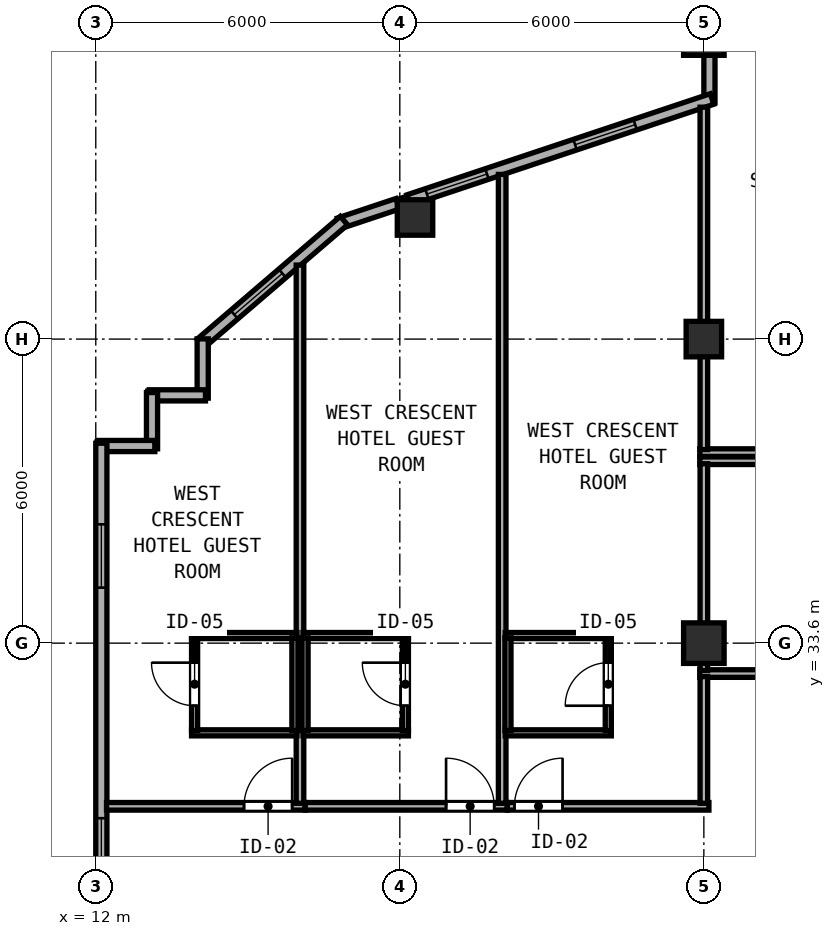
"""IFC4 building model, lengths in metres.
Left out: names, types, materials, properties, quantities, classifications, styles, units other than length and angle.
Written with IfcOpenShell. Run it as: python <this file> out.ifc"""

import sys

from ifc_helpers import new_model, si_unit, direction, frame, frame_2d, origin, origin_2d, place, context, subcontext, project, spatial, rectangle, hollow_rectangle, extrude, element, fill, save


model = new_model("IFC4")
c1 = context("Model", 3, precision=1e-05, world=origin(), true_north=direction((0.0, 1.0)))
c2 = subcontext(c1, "Body", "Model", "MODEL_VIEW")
j1 = project(units=[si_unit("LENGTHUNIT", "METRE"), si_unit("PLANEANGLEUNIT", "RADIAN")], contexts=[c1])
p1 = place(None, origin())
s1 = spatial("IfcSite", under=j1, at=p1, CompositionType="ELEMENT")
p2 = place(p1, origin())
s2 = spatial("IfcBuilding", under=s1, at=p2, CompositionType="ELEMENT")
p3 = place(p2, frame((0.0, 0.0, 258.3)))
s3 = spatial("IfcBuildingStorey", under=s2, at=p3, CompositionType="ELEMENT", Elevation=258.3)
for number, where, z_axis, x_axis in (
    (1, (24.0, 33.6, 0.0), (0.0, 0.0, 1.0), (1.0, 0.0, 0.0)),
    (2, (24.0, 45.6, 0.0), (0.0, 0.0, 1.0), (1.0, 0.0, 0.0)),
):
    element("IfcColumn", number, at=place(p3, frame(where, z_axis=z_axis, x_axis=x_axis)), inside=s3, PredefinedType="COLUMN", context=c2, shape_type="SweptSolid", body=[
        extrude(hollow_rectangle(XDim=0.8, YDim=0.8, WallThickness=0.03, at=origin_2d()), origin(), (0.0, 0.0, 1.0), 3.85),
    ])
for number, where, z_axis, x_axis in (
    (3, (24.0, 39.6, 0.0), (0.0, 0.0, 1.0), (1.0, 0.0, 0.0)),
    (4, (18.3, 42.0, 0.0), (0.0, 0.0, 1.0), (1.0, 0.0, 0.0)),
):
    element("IfcColumn", number, at=place(p3, frame(where, z_axis=z_axis, x_axis=x_axis)), inside=s3, PredefinedType="COLUMN", context=c2, shape_type="SweptSolid", body=[
        extrude(hollow_rectangle(XDim=0.7, YDim=0.7, WallThickness=0.026, at=origin_2d()), origin(), (0.0, 0.0, 1.0), 3.85),
    ])
p4 = place(p3, frame((24.11, 45.208, 0.0), z_axis=(0.0, 0.0, 1.0), x_axis=(0.0, -1.0, 0.0)))
e5 = element("IfcWall", 5, at=p4, inside=s3, PredefinedType="SOLIDWALL", context=c2, shape_type="SweptSolid", body=[
    extrude(rectangle(XDim=0.942, YDim=0.22, at=frame_2d((0.471, 0.0))), origin(), (0.0, 0.0, 1.0), 3.315),
])
p5 = place(p3, frame((24.162, 44.338, 0.0), z_axis=(0.0, 0.0, 1.0), x_axis=(-0.948687165594, -0.31621616315, 0.0)))
e6 = element("IfcWall", 6, at=p5, inside=s3, PredefinedType="SOLIDWALL", context=c2, shape_type="SweptSolid", body=[
    extrude(rectangle(XDim=6.312, YDim=0.22, at=frame_2d((3.156, 0.0))), origin(), (0.0, 0.0, 1.0), 3.315),
])
p6 = place(p5, frame((1.6, 0.0, 0.85)))
e7 = element("IfcOpeningElement", 7, at=p6, cuts=e6, PredefinedType="OPENING", context=c2, shape_type="SweptSolid", body=[
    extrude(rectangle(XDim=1.25, YDim=1.95, at=frame_2d((0.625, 0.975))), frame((0.0, 0.12, 0.0), z_axis=(0.0, -1.0, 0.0), x_axis=(1.0, 0.0, 0.0)), (0.0, 0.0, 1.0), 0.24),
])
p7 = place(p5, frame((4.682, 0.0, 0.85)))
e8 = element("IfcOpeningElement", 8, at=p7, cuts=e6, PredefinedType="OPENING", context=c2, shape_type="SweptSolid", body=[
    extrude(rectangle(XDim=1.25, YDim=1.95, at=frame_2d((0.625, 0.975))), frame((0.0, 0.12, 0.0), z_axis=(0.0, -1.0, 0.0), x_axis=(1.0, 0.0, 0.0)), (0.0, 0.0, 1.0), 0.24),
])
p8 = place(p3, frame((17.958, 42.27, 0.0), z_axis=(0.0, 0.0, 1.0), x_axis=(-0.948683298051, -0.316227766017, 0.0)))
e9 = element("IfcWall", 9, at=p8, inside=s3, PredefinedType="SOLIDWALL", context=c2, shape_type="SweptSolid", body=[
    extrude(rectangle(XDim=1.218, YDim=0.22, at=frame_2d((0.609, 0.0))), origin(), (0.0, 0.0, 1.0), 3.67),
])
p9 = place(p3, frame((16.897, 41.938, 0.0), z_axis=(0.0, 0.0, 1.0), x_axis=(-0.759279729622, -0.650764390686, 0.0)))
e10 = element("IfcWall", 10, at=p9, inside=s3, PredefinedType="SOLIDWALL", context=c2, shape_type="SweptSolid", body=[
    extrude(rectangle(XDim=3.726, YDim=0.22, at=frame_2d((1.863, 0.0))), origin(), (0.0, 0.0, 1.0), 3.67),
])
p10 = place(p9, frame((1.6, 0.0, 0.85)))
e11 = element("IfcOpeningElement", 11, at=p10, cuts=e10, PredefinedType="OPENING", context=c2, shape_type="SweptSolid", body=[
    extrude(rectangle(XDim=1.25, YDim=1.95, at=frame_2d((0.625, 0.975))), frame((0.0, 0.12, 0.0), z_axis=(0.0, -1.0, 0.0), x_axis=(1.0, 0.0, 0.0)), (0.0, 0.0, 1.0), 0.24),
])
p11 = place(p3, frame((14.11, 39.604, 0.0), z_axis=(0.0, 0.0, 1.0), x_axis=(0.0, -1.0, 0.0)))
e12 = element("IfcWall", 12, at=p11, inside=s3, PredefinedType="SOLIDWALL", context=c2, shape_type="SweptSolid", body=[
    extrude(rectangle(XDim=1.169, YDim=0.22, at=frame_2d((0.585, 0.0))), origin(), (0.0, 0.0, 1.0), 3.67),
])
p12 = place(p3, frame((14.165, 38.49, 0.0), z_axis=(0.0, 0.0, 1.0), x_axis=(-1.0, 0.0, 0.0)))
e13 = element("IfcWall", 13, at=p12, inside=s3, PredefinedType="SOLIDWALL", context=c2, shape_type="SweptSolid", body=[
    extrude(rectangle(XDim=1.11, YDim=0.22, at=frame_2d((0.555, 0.0))), origin(), (0.0, 0.0, 1.0), 3.67),
])
p13 = place(p3, frame((13.11, 38.545, 0.0), z_axis=(0.0, 0.0, 1.0), x_axis=(0.0, -1.0, 0.0)))
e14 = element("IfcWall", 14, at=p13, inside=s3, PredefinedType="SOLIDWALL", context=c2, shape_type="SweptSolid", body=[
    extrude(rectangle(XDim=1.11, YDim=0.22, at=frame_2d((0.555, 0.0))), origin(), (0.0, 0.0, 1.0), 3.67),
])
p14 = place(p3, frame((13.165, 37.49, 0.0), z_axis=(0.0, 0.0, 1.0), x_axis=(-1.0, 0.0, 0.0)))
e15 = element("IfcWall", 15, at=p14, inside=s3, PredefinedType="SOLIDWALL", context=c2, shape_type="SweptSolid", body=[
    extrude(rectangle(XDim=1.11, YDim=0.22, at=frame_2d((0.555, 0.0))), origin(), (0.0, 0.0, 1.0), 3.67),
])
p15 = place(p3, frame((12.11, 37.545, 0.0), z_axis=(0.0, 0.0, 1.0), x_axis=(0.0, -1.0, 0.0)))
e16 = element("IfcWall", 16, at=p15, inside=s3, PredefinedType="SOLIDWALL", context=c2, shape_type="SweptSolid", body=[
    extrude(rectangle(XDim=21.145, YDim=0.22, at=frame_2d((10.573, 0.0))), origin(), (0.0, 0.0, 1.0), 3.67),
])
p16 = place(p15, frame((1.6, 0.0, 0.85)))
e17 = element("IfcOpeningElement", 17, at=p16, cuts=e16, PredefinedType="OPENING", context=c2, shape_type="SweptSolid", body=[
    extrude(rectangle(XDim=1.25, YDim=1.95, at=frame_2d((0.625, 0.975))), frame((0.0, 0.12, 0.0), z_axis=(0.0, -1.0, 0.0), x_axis=(1.0, 0.0, 0.0)), (0.0, 0.0, 1.0), 0.24),
])
p17 = place(p15, frame((7.4, 0.0, 0.85)))
e18 = element("IfcOpeningElement", 18, at=p17, cuts=e16, PredefinedType="OPENING", context=c2, shape_type="SweptSolid", body=[
    extrude(rectangle(XDim=1.25, YDim=1.95, at=frame_2d((0.625, 0.975))), frame((0.0, 0.12, 0.0), z_axis=(0.0, -1.0, 0.0), x_axis=(1.0, 0.0, 0.0)), (0.0, 0.0, 1.0), 0.24),
])
p18 = place(p15, frame((12.4, 0.0, 0.85)))
e19 = element("IfcOpeningElement", 19, at=p18, cuts=e16, PredefinedType="OPENING", context=c2, shape_type="SweptSolid", body=[
    extrude(rectangle(XDim=1.25, YDim=1.95, at=frame_2d((0.625, 0.975))), frame((0.0, 0.12, 0.0), z_axis=(0.0, -1.0, 0.0), x_axis=(1.0, 0.0, 0.0)), (0.0, 0.0, 1.0), 0.24),
])
p19 = place(p15, frame((17.8, 0.0, 0.85)))
e20 = element("IfcOpeningElement", 20, at=p19, cuts=e16, PredefinedType="OPENING", context=c2, shape_type="SweptSolid", body=[
    extrude(rectangle(XDim=1.25, YDim=1.95, at=frame_2d((0.625, 0.975))), frame((0.0, 0.12, 0.0), z_axis=(0.0, -1.0, 0.0), x_axis=(1.0, 0.0, 0.0)), (0.0, 0.0, 1.0), 0.24),
])
for number, where, z_axis, x_axis in (
    (21, (23.92, 37.2, 0.0), (0.0, 0.0, 1.0), (1.0, 0.0, 0.0)),
    (22, (23.92, 33.0, 0.0), (0.0, 0.0, 1.0), (1.0, 0.0, 0.0)),
):
    element("IfcWall", number, at=place(p3, frame(where, z_axis=z_axis, x_axis=x_axis)), inside=s3, PredefinedType="PARTITIONING", context=c2, shape_type="SweptSolid", body=[
        extrude(rectangle(XDim=4.04, YDim=0.15, at=frame_2d((2.02, 0.0))), origin(), (0.0, 0.0, 1.0), 3.67),
    ])
p20 = place(p3, frame((24.0, 33.06, 0.0), z_axis=(0.0, 0.0, 1.0), x_axis=(0.0, 1.0, 0.0)))
e23 = element("IfcWall", 23, at=p20, inside=s3, PredefinedType="PARTITIONING", context=c2, shape_type="SweptSolid", body=[
    extrude(rectangle(XDim=4.08, YDim=0.15, at=frame_2d((2.04, 0.0))), origin(), (0.0, 0.0, 1.0), 3.315),
])
p21 = place(p3, frame((23.92, 37.36, 0.0), z_axis=(0.0, 0.0, 1.0), x_axis=(1.0, 0.0, 0.0)))
e24 = element("IfcWall", 24, at=p21, inside=s3, PredefinedType="PARTITIONING", context=c2, shape_type="SweptSolid", body=[
    extrude(rectangle(XDim=4.04, YDim=0.15, at=frame_2d((2.02, 0.0))), origin(), (0.0, 0.0, 1.0), 3.67),
])
p22 = place(p3, frame((24.0, 37.42, 0.0), z_axis=(0.0, 0.0, 1.0), x_axis=(0.0, 1.0, 0.0)))
e25 = element("IfcWall", 25, at=p22, inside=s3, PredefinedType="PARTITIONING", context=c2, shape_type="SweptSolid", body=[
    extrude(rectangle(XDim=6.757, YDim=0.15, at=frame_2d((3.378, 0.0))), origin(), (0.0, 0.0, 1.0), 3.315),
])
p23 = place(p3, frame((12.212, 30.38, 0.0), z_axis=(0.0, 0.0, 1.0), x_axis=(1.0, 0.0, 0.0)))
e26 = element("IfcWall", 26, at=p23, inside=s3, PredefinedType="PARTITIONING", context=c2, shape_type="SweptSolid", body=[
    extrude(rectangle(XDim=3.918, YDim=0.15, at=frame_2d((1.959, 0.0))), origin(), (0.0, 0.0, 1.0), 3.67),
])
p24 = place(p23, frame((2.713, 0.0, 0.0)))
e27 = element("IfcOpeningElement", 27, at=p24, cuts=e26, PredefinedType="OPENING", context=c2, shape_type="SweptSolid", body=[
    extrude(rectangle(XDim=0.95, YDim=2.15, at=frame_2d((0.475, 1.075))), frame((0.0, 0.085, 0.0), z_axis=(0.0, -1.0, 0.0), x_axis=(1.0, 0.0, 0.0)), (0.0, 0.0, 1.0), 0.17),
])
p25 = place(p3, frame((16.03, 30.44, 0.0), z_axis=(0.0, 0.0, 1.0), x_axis=(0.0, 1.0, 0.0)))
e28 = element("IfcWall", 28, at=p25, inside=s3, PredefinedType="PARTITIONING", context=c2, shape_type="SweptSolid", body=[
    extrude(rectangle(XDim=10.621, YDim=0.15, at=frame_2d((5.311, 0.0))), origin(), (0.0, 0.0, 1.0), 3.67),
])
for number, where, z_axis, x_axis in (
    (29, (13.89, 33.75, 0.0), (0.0, 0.0, 1.0), (1.0, 0.0, 0.0)),
    (30, (13.89, 31.83, 0.0), (0.0, 0.0, 1.0), (1.0, 0.0, 0.0)),
):
    element("IfcWall", number, at=place(p3, frame(where, z_axis=z_axis, x_axis=x_axis)), inside=s3, PredefinedType="PARTITIONING", context=c2, shape_type="SweptSolid", body=[
        extrude(rectangle(XDim=2.08, YDim=0.12, at=frame_2d((1.04, 0.0))), origin(), (0.0, 0.0, 1.0), 3.67),
    ])
p26 = place(p3, frame((13.95, 31.875, 0.0), z_axis=(0.0, 0.0, 1.0), x_axis=(0.0, 1.0, 0.0)))
e31 = element("IfcWall", 31, at=p26, inside=s3, PredefinedType="PARTITIONING", context=c2, shape_type="SweptSolid", body=[
    extrude(rectangle(XDim=1.83, YDim=0.12, at=frame_2d((0.915, 0.0))), origin(), (0.0, 0.0, 1.0), 3.67),
])
p27 = place(p26, frame((1.34, 0.0, 0.0), z_axis=(0.0, 0.0, 1.0), x_axis=(-1.0, 0.0, 0.0)))
e32 = element("IfcOpeningElement", 32, at=p27, cuts=e31, PredefinedType="OPENING", context=c2, shape_type="SweptSolid", body=[
    extrude(rectangle(XDim=0.85, YDim=2.1, at=frame_2d((0.425, 1.05))), frame((0.0, 0.07, 0.0), z_axis=(0.0, -1.0, 0.0), x_axis=(1.0, 0.0, 0.0)), (0.0, 0.0, 1.0), 0.14),
])
p28 = place(p3, frame((15.93, 31.875, 0.0), z_axis=(0.0, 0.0, 1.0), x_axis=(0.0, 1.0, 0.0)))
e33 = element("IfcWall", 33, at=p28, inside=s3, PredefinedType="PARTITIONING", context=c2, shape_type="SweptSolid", body=[
    extrude(rectangle(XDim=1.83, YDim=0.12, at=frame_2d((0.915, 0.0))), origin(), (0.0, 0.0, 1.0), 3.67),
])
p29 = place(p3, frame((16.132, 30.38, 0.0), z_axis=(0.0, 0.0, 1.0), x_axis=(1.0, 0.0, 0.0)))
e34 = element("IfcWall", 34, at=p29, inside=s3, PredefinedType="PARTITIONING", context=c2, shape_type="SweptSolid", body=[
    extrude(rectangle(XDim=3.988, YDim=0.15, at=frame_2d((1.994, 0.0))), origin(), (0.0, 0.0, 1.0), 3.67),
])
p30 = place(p29, frame((2.781, 0.0, 0.0)))
e35 = element("IfcOpeningElement", 35, at=p30, cuts=e34, PredefinedType="OPENING", context=c2, shape_type="SweptSolid", body=[
    extrude(rectangle(XDim=0.95, YDim=2.15, at=frame_2d((0.475, 1.075))), frame((0.0, 0.085, 0.0), z_axis=(0.0, -1.0, 0.0), x_axis=(1.0, 0.0, 0.0)), (0.0, 0.0, 1.0), 0.17),
])
p31 = place(p3, frame((20.02, 30.44, 0.0), z_axis=(0.0, 0.0, 1.0), x_axis=(0.0, 1.0, 0.0)))
e36 = element("IfcWall", 36, at=p31, inside=s3, PredefinedType="PARTITIONING", context=c2, shape_type="SweptSolid", body=[
    extrude(rectangle(XDim=12.41, YDim=0.15, at=frame_2d((6.205, 0.0))), origin(), (0.0, 0.0, 1.0), 3.67),
])
for number, where, z_axis, x_axis in (
    (37, (16.09, 33.75, 0.0), (0.0, 0.0, 1.0), (1.0, 0.0, 0.0)),
    (38, (16.09, 31.83, 0.0), (0.0, 0.0, 1.0), (1.0, 0.0, 0.0)),
):
    element("IfcWall", number, at=place(p3, frame(where, z_axis=z_axis, x_axis=x_axis)), inside=s3, PredefinedType="PARTITIONING", context=c2, shape_type="SweptSolid", body=[
        extrude(rectangle(XDim=2.08, YDim=0.12, at=frame_2d((1.04, 0.0))), origin(), (0.0, 0.0, 1.0), 3.67),
    ])
p32 = place(p3, frame((16.13, 31.875, 0.0), z_axis=(0.0, 0.0, 1.0), x_axis=(0.0, 1.0, 0.0)))
e39 = element("IfcWall", 39, at=p32, inside=s3, PredefinedType="PARTITIONING", context=c2, shape_type="SweptSolid", body=[
    extrude(rectangle(XDim=1.83, YDim=0.12, at=frame_2d((0.915, 0.0))), origin(), (0.0, 0.0, 1.0), 3.67),
])
p33 = place(p3, frame((18.11, 31.875, 0.0), z_axis=(0.0, 0.0, 1.0), x_axis=(0.0, 1.0, 0.0)))
e40 = element("IfcWall", 40, at=p33, inside=s3, PredefinedType="PARTITIONING", context=c2, shape_type="SweptSolid", body=[
    extrude(rectangle(XDim=1.83, YDim=0.12, at=frame_2d((0.915, 0.0))), origin(), (0.0, 0.0, 1.0), 3.67),
])
p34 = place(p33, frame((0.49, 0.0, 0.0)))
e41 = element("IfcOpeningElement", 41, at=p34, cuts=e40, PredefinedType="OPENING", context=c2, shape_type="SweptSolid", body=[
    extrude(rectangle(XDim=0.85, YDim=2.1, at=frame_2d((0.425, 1.05))), frame((0.0, 0.07, 0.0), z_axis=(0.0, -1.0, 0.0), x_axis=(1.0, 0.0, 0.0)), (0.0, 0.0, 1.0), 0.14),
])
p35 = place(p3, frame((20.122, 30.38, 0.0), z_axis=(0.0, 0.0, 1.0), x_axis=(1.0, 0.0, 0.0)))
e42 = element("IfcWall", 42, at=p35, inside=s3, PredefinedType="PARTITIONING", context=c2, shape_type="SweptSolid", body=[
    extrude(rectangle(XDim=3.978, YDim=0.15, at=frame_2d((1.989, 0.0))), origin(), (0.0, 0.0, 1.0), 3.67),
])
p36 = place(p35, frame((0.14, 0.0, 0.0)))
e43 = element("IfcOpeningElement", 43, at=p36, cuts=e42, PredefinedType="OPENING", context=c2, shape_type="SweptSolid", body=[
    extrude(rectangle(XDim=0.95, YDim=2.15, at=frame_2d((0.475, 1.075))), frame((0.0, 0.085, 0.0), z_axis=(0.0, -1.0, 0.0), x_axis=(1.0, 0.0, 0.0)), (0.0, 0.0, 1.0), 0.17),
])
p37 = place(p3, frame((24.0, 30.44, 0.0), z_axis=(0.0, 0.0, 1.0), x_axis=(0.0, 1.0, 0.0)))
e44 = element("IfcWall", 44, at=p37, inside=s3, PredefinedType="PARTITIONING", context=c2, shape_type="SweptSolid", body=[
    extrude(rectangle(XDim=2.5, YDim=0.15, at=frame_2d((1.25, 0.0))), origin(), (0.0, 0.0, 1.0), 3.315),
])
for number, where, z_axis, x_axis in (
    (45, (20.08, 33.75, 0.0), (0.0, 0.0, 1.0), (1.0, 0.0, 0.0)),
    (46, (20.08, 31.83, 0.0), (0.0, 0.0, 1.0), (1.0, 0.0, 0.0)),
):
    element("IfcWall", number, at=place(p3, frame(where, z_axis=z_axis, x_axis=x_axis)), inside=s3, PredefinedType="PARTITIONING", context=c2, shape_type="SweptSolid", body=[
        extrude(rectangle(XDim=2.094, YDim=0.12, at=frame_2d((1.047, 0.0))), origin(), (0.0, 0.0, 1.0), 3.67),
    ])
p38 = place(p3, frame((20.134, 31.875, 0.0), z_axis=(0.0, 0.0, 1.0), x_axis=(0.0, 1.0, 0.0)))
e47 = element("IfcWall", 47, at=p38, inside=s3, PredefinedType="PARTITIONING", context=c2, shape_type="SweptSolid", body=[
    extrude(rectangle(XDim=1.83, YDim=0.12, at=frame_2d((0.915, 0.0))), origin(), (0.0, 0.0, 1.0), 3.67),
])
p39 = place(p3, frame((22.114, 31.875, 0.0), z_axis=(0.0, 0.0, 1.0), x_axis=(0.0, 1.0, 0.0)))
e48 = element("IfcWall", 48, at=p39, inside=s3, PredefinedType="PARTITIONING", context=c2, shape_type="SweptSolid", body=[
    extrude(rectangle(XDim=1.83, YDim=0.12, at=frame_2d((0.915, 0.0))), origin(), (0.0, 0.0, 1.0), 3.67),
])
p40 = place(p39, frame((0.49, 0.0, 0.0)))
e49 = element("IfcOpeningElement", 49, at=p40, cuts=e48, PredefinedType="OPENING", context=c2, shape_type="SweptSolid", body=[
    extrude(rectangle(XDim=0.85, YDim=2.1, at=frame_2d((0.425, 1.05))), frame((0.0, 0.07, 0.0), z_axis=(0.0, -1.0, 0.0), x_axis=(1.0, 0.0, 0.0)), (0.0, 0.0, 1.0), 0.14),
])
p41 = place(p6, origin())
e50 = element("IfcWindow", 50, at=p41, inside=s3, PartitioningType="SINGLE_PANEL", PredefinedType="WINDOW", context=c2, shape_type="SweptSolid", body=[
    extrude(rectangle(XDim=1.25, YDim=1.95, at=frame_2d((0.625, 0.975))), frame((0.0, 0.03, 0.0), z_axis=(0.0, -1.0, 0.0), x_axis=(1.0, 0.0, 0.0)), (0.0, 0.0, 1.0), 0.06),
])
fill(e7, e50)
p42 = place(p10, origin())
e51 = element("IfcWindow", 51, at=p42, inside=s3, PartitioningType="SINGLE_PANEL", PredefinedType="WINDOW", context=c2, shape_type="SweptSolid", body=[
    extrude(rectangle(XDim=1.25, YDim=1.95, at=frame_2d((0.625, 0.975))), frame((0.0, 0.03, 0.0), z_axis=(0.0, -1.0, 0.0), x_axis=(1.0, 0.0, 0.0)), (0.0, 0.0, 1.0), 0.06),
])
fill(e11, e51)
p43 = place(p16, origin())
e52 = element("IfcWindow", 52, at=p43, inside=s3, PartitioningType="SINGLE_PANEL", PredefinedType="WINDOW", context=c2, shape_type="SweptSolid", body=[
    extrude(rectangle(XDim=1.25, YDim=1.95, at=frame_2d((0.625, 0.975))), frame((0.0, 0.03, 0.0), z_axis=(0.0, -1.0, 0.0), x_axis=(1.0, 0.0, 0.0)), (0.0, 0.0, 1.0), 0.06),
])
fill(e17, e52)
p44 = place(p17, origin())
e53 = element("IfcWindow", 53, at=p44, inside=s3, PartitioningType="SINGLE_PANEL", PredefinedType="WINDOW", context=c2, shape_type="SweptSolid", body=[
    extrude(rectangle(XDim=1.25, YDim=1.95, at=frame_2d((0.625, 0.975))), frame((0.0, 0.03, 0.0), z_axis=(0.0, -1.0, 0.0), x_axis=(1.0, 0.0, 0.0)), (0.0, 0.0, 1.0), 0.06),
])
fill(e18, e53)
p45 = place(p24, origin())
e54 = element("IfcDoor", 54, at=p45, inside=s3, OperationType="SINGLE_SWING_RIGHT", PredefinedType="DOOR", context=c2, shape_type="SweptSolid", body=[
    extrude(rectangle(XDim=0.95, YDim=2.15, at=frame_2d((0.475, 1.075))), frame((0.0, 0.025, 0.0), z_axis=(0.0, -1.0, 0.0), x_axis=(1.0, 0.0, 0.0)), (0.0, 0.0, 1.0), 0.05),
])
fill(e27, e54)
p46 = place(p27, origin())
e55 = element("IfcDoor", 55, at=p46, inside=s3, OperationType="SINGLE_SWING_LEFT", PredefinedType="DOOR", context=c2, shape_type="SweptSolid", body=[
    extrude(rectangle(XDim=0.85, YDim=2.1, at=frame_2d((0.425, 1.05))), frame((0.0, 0.025, 0.0), z_axis=(0.0, -1.0, 0.0), x_axis=(1.0, 0.0, 0.0)), (0.0, 0.0, 1.0), 0.05),
])
fill(e32, e55)
p47 = place(p30, origin())
e56 = element("IfcDoor", 56, at=p47, inside=s3, OperationType="SINGLE_SWING_LEFT", PredefinedType="DOOR", context=c2, shape_type="SweptSolid", body=[
    extrude(rectangle(XDim=0.95, YDim=2.15, at=frame_2d((0.475, 1.075))), frame((0.0, 0.025, 0.0), z_axis=(0.0, -1.0, 0.0), x_axis=(1.0, 0.0, 0.0)), (0.0, 0.0, 1.0), 0.05),
])
fill(e35, e56)
p48 = place(p34, origin())
e57 = element("IfcDoor", 57, at=p48, inside=s3, OperationType="SINGLE_SWING_RIGHT", PredefinedType="DOOR", context=c2, shape_type="SweptSolid", body=[
    extrude(rectangle(XDim=0.85, YDim=2.1, at=frame_2d((0.425, 1.05))), frame((0.0, 0.025, 0.0), z_axis=(0.0, -1.0, 0.0), x_axis=(1.0, 0.0, 0.0)), (0.0, 0.0, 1.0), 0.05),
])
fill(e41, e57)
p49 = place(p36, origin())
e58 = element("IfcDoor", 58, at=p49, inside=s3, OperationType="SINGLE_SWING_RIGHT", PredefinedType="DOOR", context=c2, shape_type="SweptSolid", body=[
    extrude(rectangle(XDim=0.95, YDim=2.15, at=frame_2d((0.475, 1.075))), frame((0.0, 0.025, 0.0), z_axis=(0.0, -1.0, 0.0), x_axis=(1.0, 0.0, 0.0)), (0.0, 0.0, 1.0), 0.05),
])
fill(e43, e58)
p50 = place(p40, origin())
e59 = element("IfcDoor", 59, at=p50, inside=s3, OperationType="SINGLE_SWING_LEFT", PredefinedType="DOOR", context=c2, shape_type="SweptSolid", body=[
    extrude(rectangle(XDim=0.85, YDim=2.1, at=frame_2d((0.425, 1.05))), frame((0.0, 0.025, 0.0), z_axis=(0.0, -1.0, 0.0), x_axis=(1.0, 0.0, 0.0)), (0.0, 0.0, 1.0), 0.05),
])
fill(e49, e59)
p51 = place(p7, origin())
e60 = element("IfcWindow", 60, at=p51, inside=s3, PartitioningType="SINGLE_PANEL", PredefinedType="WINDOW", context=c2, shape_type="SweptSolid", body=[
    extrude(rectangle(XDim=1.25, YDim=1.95, at=frame_2d((0.625, 0.975))), frame((0.0, 0.03, 0.0), z_axis=(0.0, -1.0, 0.0), x_axis=(1.0, 0.0, 0.0)), (0.0, 0.0, 1.0), 0.06),
])
fill(e8, e60)
save(model, sys.argv[1])
